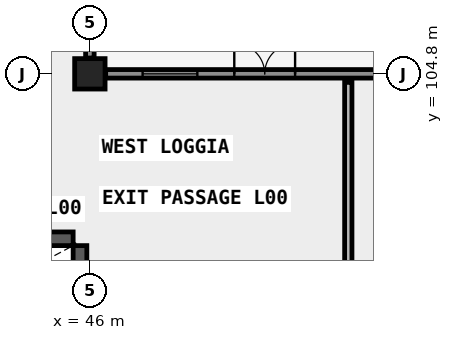
"""IFC4 building model, lengths in metres.
Left out: names, types, materials, properties, quantities, classifications, styles, units other than length and angle.
Written with IfcOpenShell. Run it as: python <this file> out.ifc"""

import sys

from ifc_helpers import new_model, si_unit, direction, frame, frame_2d, origin, origin_2d, place, context, subcontext, project, spatial, rectangle, extrude, element, fill, save


model = new_model("IFC4")
c1 = context("Model", 3, precision=1e-05, world=origin(), true_north=direction((0.0, 1.0)))
c2 = subcontext(c1, "Body", "Model", "MODEL_VIEW")
j1 = project(units=[si_unit("LENGTHUNIT", "METRE"), si_unit("PLANEANGLEUNIT", "RADIAN")], contexts=[c1])
p1 = place(None, origin())
s1 = spatial("IfcSite", under=j1, at=p1, CompositionType="ELEMENT")
p2 = place(p1, origin())
s2 = spatial("IfcBuilding", under=s1, at=p2, CompositionType="ELEMENT")
p3 = place(p2, origin())
s3 = spatial("IfcBuildingStorey", under=s2, at=p3, CompositionType="ELEMENT", Elevation=0.0)
p4 = place(p3, frame((46.0, 104.8, 0.0), z_axis=(0.0, 0.0, 1.0), x_axis=(1.0, 0.0, 0.0)))
e1 = element("IfcColumn", 1, at=p4, inside=s3, PredefinedType="COLUMN", context=c2, shape_type="SweptSolid", body=[
    extrude(rectangle(XDim=1.0, YDim=1.0, at=origin_2d()), origin(), (0.0, 0.0, 1.0), 4.2),
])
p5 = place(p3, frame((36.35, 99.375, 0.0), z_axis=(0.0, 0.0, 1.0), x_axis=(1.0, 0.0, 0.0)))
e2 = element("IfcWall", 2, at=p5, inside=s3, PredefinedType="SHEAR", context=c2, shape_type="SweptSolid", body=[
    extrude(rectangle(XDim=9.1, YDim=0.45, at=frame_2d((4.55, 0.0))), origin(), (0.0, 0.0, 1.0), 4.2),
])
p6 = place(p5, frame((0.55, 0.0, 0.0)))
e3 = element("IfcOpeningElement", 3, at=p6, cuts=e2, PredefinedType="OPENING", context=c2, shape_type="SweptSolid", body=[
    extrude(rectangle(XDim=1.13, YDim=2.15, at=frame_2d((0.565, 1.075))), frame((0.0, 0.235, 0.0), z_axis=(0.0, -1.0, 0.0), x_axis=(1.0, 0.0, 0.0)), (0.0, 0.0, 1.0), 0.47),
])
p7 = place(p3, frame((45.675, 95.32, 0.0), z_axis=(0.0, 0.0, 1.0), x_axis=(0.0, 1.0, 0.0)))
e4 = element("IfcWall", 4, at=p7, inside=s3, PredefinedType="SHEAR", context=c2, shape_type="SweptSolid", body=[
    extrude(rectangle(XDim=3.83, YDim=0.45, at=frame_2d((1.915, 0.0))), origin(), (0.0, 0.0, 1.0), 4.2),
])
p8 = place(p3, frame((46.52, 104.8, 0.0), z_axis=(0.0, 0.0, 1.0), x_axis=(1.0, 0.0, 0.0)))
e5 = element("IfcWall", 5, at=p8, inside=s3, PredefinedType="SOLIDWALL", context=c2, shape_type="SweptSolid", body=[
    extrude(rectangle(XDim=10.46, YDim=0.28, at=frame_2d((5.23, 0.0))), origin(), (0.0, 0.0, 1.0), 3.15),
])
p9 = place(p8, frame((4.23, 0.0, 0.0)))
e6 = element("IfcOpeningElement", 6, at=p9, cuts=e5, PredefinedType="OPENING", context=c2, shape_type="SweptSolid", body=[
    extrude(rectangle(XDim=2.0, YDim=2.4, at=frame_2d((1.0, 1.2))), frame((0.0, 0.15, 0.0), z_axis=(0.0, -1.0, 0.0), x_axis=(1.0, 0.0, 0.0)), (0.0, 0.0, 1.0), 0.3),
])
p10 = place(p8, frame((1.215, 0.0, 0.78)))
e7 = element("IfcOpeningElement", 7, at=p10, cuts=e5, PredefinedType="OPENING", context=c2, shape_type="SweptSolid", body=[
    extrude(rectangle(XDim=1.8, YDim=1.95, at=frame_2d((0.9, 0.975))), frame((0.0, 0.15, 0.0), z_axis=(0.0, -1.0, 0.0), x_axis=(1.0, 0.0, 0.0)), (0.0, 0.0, 1.0), 0.3),
])
p11 = place(p3, frame((46.0, 105.32, 0.0), z_axis=(0.0, 0.0, 1.0), x_axis=(0.0, 1.0, 0.0)))
e8 = element("IfcWall", 8, at=p11, inside=s3, PredefinedType="SOLIDWALL", context=c2, shape_type="SweptSolid", body=[
    extrude(rectangle(XDim=8.96, YDim=0.28, at=frame_2d((4.48, 0.0))), origin(), (0.0, 0.0, 1.0), 3.15),
])
p12 = place(p11, frame((0.89, 0.0, 0.85)))
e9 = element("IfcOpeningElement", 9, at=p12, cuts=e8, PredefinedType="OPENING", context=c2, shape_type="SweptSolid", body=[
    extrude(rectangle(XDim=1.8, YDim=1.95, at=frame_2d((0.9, 0.975))), frame((0.0, 0.15, 0.0), z_axis=(0.0, -1.0, 0.0), x_axis=(1.0, 0.0, 0.0)), (0.0, 0.0, 1.0), 0.3),
])
p13 = place(p11, frame((3.58, 0.0, 0.85)))
e10 = element("IfcOpeningElement", 10, at=p13, cuts=e8, PredefinedType="OPENING", context=c2, shape_type="SweptSolid", body=[
    extrude(rectangle(XDim=1.8, YDim=1.95, at=frame_2d((0.9, 0.975))), frame((0.0, 0.15, 0.0), z_axis=(0.0, -1.0, 0.0), x_axis=(1.0, 0.0, 0.0)), (0.0, 0.0, 1.0), 0.3),
])
p14 = place(p11, frame((6.27, 0.0, 0.85)))
e11 = element("IfcOpeningElement", 11, at=p14, cuts=e8, PredefinedType="OPENING", context=c2, shape_type="SweptSolid", body=[
    extrude(rectangle(XDim=1.8, YDim=1.95, at=frame_2d((0.9, 0.975))), frame((0.0, 0.15, 0.0), z_axis=(0.0, -1.0, 0.0), x_axis=(1.0, 0.0, 0.0)), (0.0, 0.0, 1.0), 0.3),
])
p15 = place(p3, frame((54.5, 95.4, 0.0), z_axis=(0.0, 0.0, 1.0), x_axis=(0.0, 1.0, 0.0)))
e12 = element("IfcWall", 12, at=p15, inside=s3, PredefinedType="SOLIDWALL", context=c2, shape_type="SweptSolid", body=[
    extrude(rectangle(XDim=9.12, YDim=0.24, at=frame_2d((4.56, 0.0))), origin(), (0.0, 0.0, 1.0), 3.88),
])
p16 = place(p9, origin())
e13 = element("IfcDoor", 13, at=p16, inside=s3, OperationType="DOUBLE_DOOR_SINGLE_SWING", PredefinedType="DOOR", context=c2, shape_type="SweptSolid", body=[
    extrude(rectangle(XDim=2.0, YDim=2.4, at=frame_2d((1.0, 1.2))), frame((0.0, 0.025, 0.0), z_axis=(0.0, -1.0, 0.0), x_axis=(1.0, 0.0, 0.0)), (0.0, 0.0, 1.0), 0.05),
])
fill(e6, e13)
p17 = place(p10, origin())
e14 = element("IfcWindow", 14, at=p17, inside=s3, PartitioningType="SINGLE_PANEL", PredefinedType="WINDOW", context=c2, shape_type="SweptSolid", body=[
    extrude(rectangle(XDim=1.8, YDim=1.95, at=frame_2d((0.9, 0.975))), frame((0.0, 0.03, 0.0), z_axis=(0.0, -1.0, 0.0), x_axis=(1.0, 0.0, 0.0)), (0.0, 0.0, 1.0), 0.06),
])
fill(e7, e14)
save(model, sys.argv[1])
